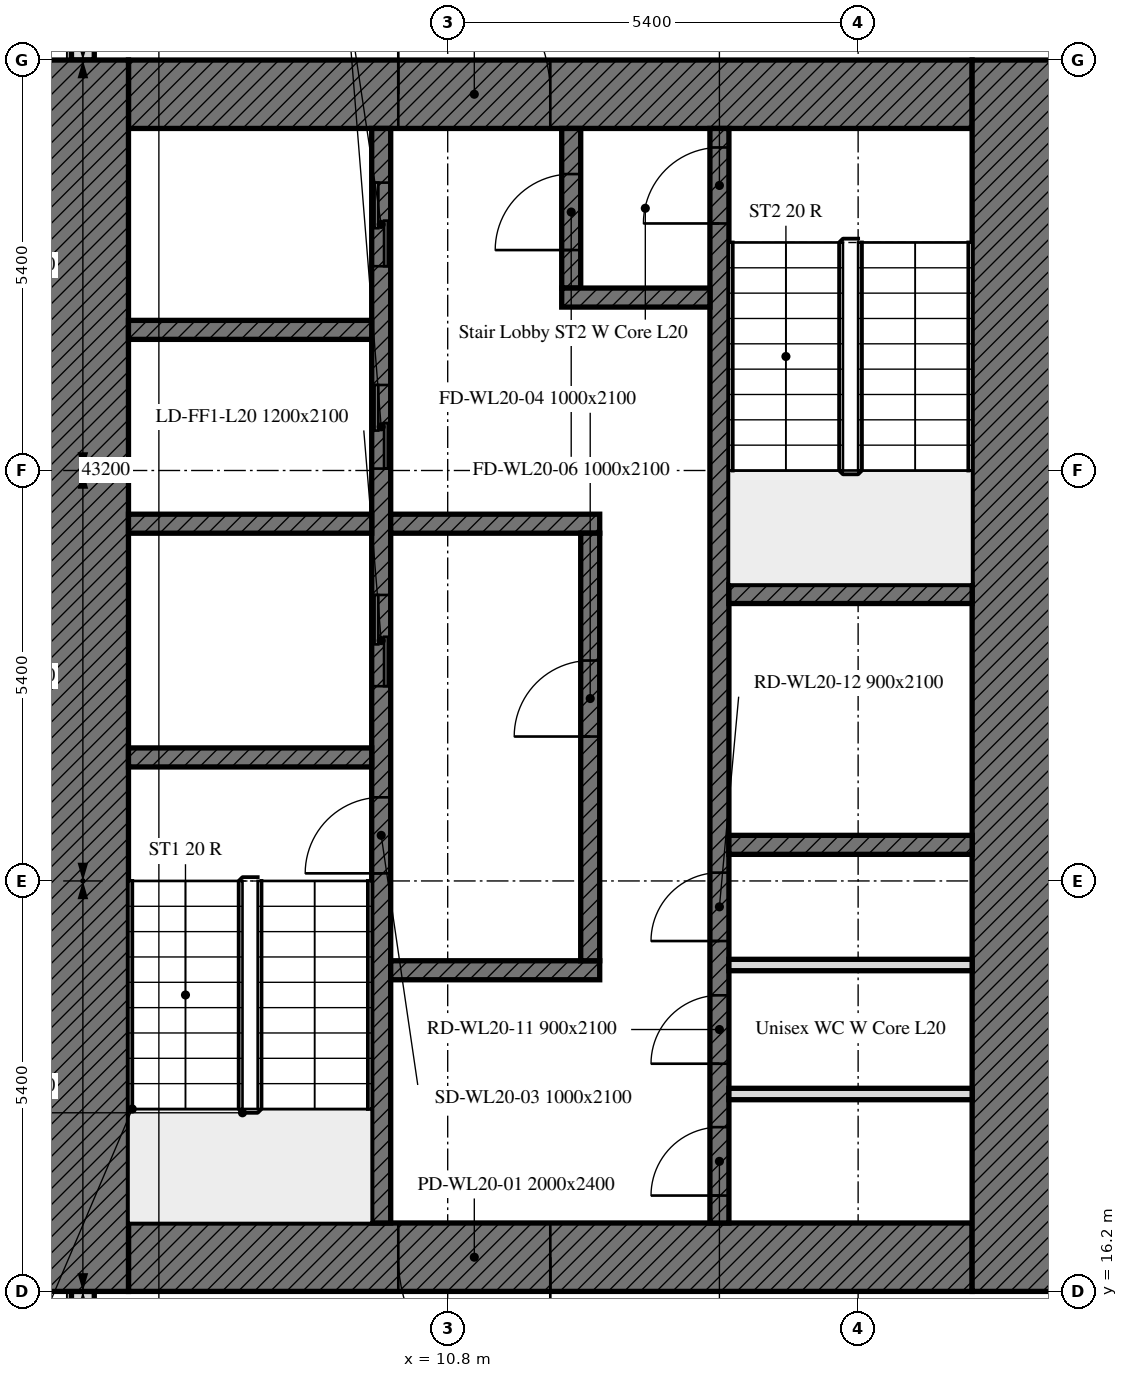
"""IFC4 building model, lengths in metres.
Left out: names, types, materials, properties, quantities, classifications, styles, units other than length and angle.
Written with IfcOpenShell. Run it as: python <this file> out.ifc"""

import sys

from ifc_helpers import new_model, si_unit, direction, frame, frame_2d, origin, place, context, subcontext, project, spatial, rectangle, extrude, element, fill, save


model = new_model("IFC4")
c1 = context("Model", 3, precision=1e-05, world=origin(), true_north=direction((0.0, 1.0)))
c2 = subcontext(c1, "Body", "Model", "MODEL_VIEW")
j1 = project(units=[si_unit("LENGTHUNIT", "METRE"), si_unit("PLANEANGLEUNIT", "RADIAN")], contexts=[c1])
p1 = place(None, origin())
s1 = spatial("IfcSite", under=j1, at=p1, CompositionType="ELEMENT")
p2 = place(p1, origin())
s2 = spatial("IfcBuilding", under=s1, at=p2, CompositionType="ELEMENT")
p3 = place(p2, frame((0.0, 0.0, 87.8)))
s3 = spatial("IfcBuildingStorey", under=s2, at=p3, CompositionType="ELEMENT", Elevation=87.8)
p4 = place(p3, frame((6.0, 43.014, 0.0), z_axis=(0.0, 0.0, 1.0), x_axis=(0.0, -1.0, 0.0)))
e1 = element("IfcWall", 1, at=p4, inside=s3, PredefinedType="SOLIDWALL", context=c2, shape_type="SweptSolid", body=[
    extrude(rectangle(XDim=10.614, YDim=0.3, at=frame_2d((5.307, 0.0))), origin(), (0.0, 0.0, 1.0), 3.5),
])
p5 = place(p4, frame((0.814, 0.0, 0.9)))
e2 = element("IfcOpeningElement", 2, at=p5, cuts=e1, PredefinedType="OPENING", context=c2, shape_type="SweptSolid", body=[
    extrude(rectangle(XDim=3.4, YDim=1.7, at=frame_2d((1.7, 0.85))), frame((0.0, 0.16, 0.0), z_axis=(0.0, -1.0, 0.0), x_axis=(1.0, 0.0, 0.0)), (0.0, 0.0, 1.0), 0.32),
])
p6 = place(p3, frame((6.0, 16.2, 0.0), z_axis=(0.0, 0.0, 1.0), x_axis=(0.0, -1.0, 0.0)))
e3 = element("IfcWall", 3, at=p6, inside=s3, PredefinedType="SOLIDWALL", context=c2, shape_type="SweptSolid", body=[
    extrude(rectangle(XDim=5.214, YDim=0.3, at=frame_2d((2.607, 0.0))), origin(), (0.0, 0.0, 1.0), 3.5),
])
p7 = place(p3, frame((17.7, 16.65, 0.0), z_axis=(0.0, 0.0, 1.0), x_axis=(-1.0, 0.0, 0.0)))
e4 = element("IfcWall", 4, at=p7, inside=s3, PredefinedType="SOLIDWALL", context=c2, shape_type="SweptSolid", body=[
    extrude(rectangle(XDim=11.1, YDim=0.9, at=frame_2d((5.55, 0.0))), origin(), (0.0, 0.0, 1.0), 3.5),
])
p8 = place(p7, frame((5.55, 0.0, 0.0)))
e5 = element("IfcOpeningElement", 5, at=p8, cuts=e4, PredefinedType="OPENING", context=c2, shape_type="SweptSolid", body=[
    extrude(rectangle(XDim=2.0, YDim=2.4, at=frame_2d((1.0, 1.2))), frame((0.0, 0.45, 0.0), z_axis=(0.0, -1.0, 0.0), x_axis=(1.0, 0.0, 0.0)), (0.0, 0.0, 1.0), 0.9),
])
p9 = place(p3, frame((6.6, 31.95, 0.0), z_axis=(0.0, 0.0, 1.0), x_axis=(1.0, 0.0, 0.0)))
e6 = element("IfcWall", 6, at=p9, inside=s3, PredefinedType="SOLIDWALL", context=c2, shape_type="SweptSolid", body=[
    extrude(rectangle(XDim=11.1, YDim=0.9, at=frame_2d((5.55, 0.0))), origin(), (0.0, 0.0, 1.0), 3.5),
])
p10 = place(p9, frame((3.55, 0.0, 0.0)))
e7 = element("IfcOpeningElement", 7, at=p10, cuts=e6, PredefinedType="OPENING", context=c2, shape_type="SweptSolid", body=[
    extrude(rectangle(XDim=2.0, YDim=2.4, at=frame_2d((1.0, 1.2))), frame((0.0, 0.45, 0.0), z_axis=(0.0, -1.0, 0.0), x_axis=(1.0, 0.0, 0.0)), (0.0, 0.0, 1.0), 0.9),
])
for number, where, z_axis, x_axis in (
    (8, (6.0, 16.2, 0.0), (0.0, 0.0, 1.0), (0.0, 1.0, 0.0)),
    (9, (18.3, 32.4, 0.0), (0.0, 0.0, 1.0), (0.0, -1.0, 0.0)),
):
    element("IfcWall", number, at=place(p3, frame(where, z_axis=z_axis, x_axis=x_axis)), inside=s3, PredefinedType="SOLIDWALL", context=c2, shape_type="SweptSolid", body=[
        extrude(rectangle(XDim=16.2, YDim=1.2, at=frame_2d((8.1, 0.0))), origin(), (0.0, 0.0, 1.0), 3.5),
    ])
p11 = place(p3, frame((9.925, 17.1, 0.0), z_axis=(0.0, 0.0, 1.0), x_axis=(0.0, 1.0, 0.0)))
e10 = element("IfcWall", 10, at=p11, inside=s3, PredefinedType="SOLIDWALL", context=c2, shape_type="SweptSolid", body=[
    extrude(rectangle(XDim=14.4, YDim=0.25, at=frame_2d((7.2, 0.0))), origin(), (0.0, 0.0, 1.0), 3.5),
])
p12 = place(p11, frame((4.6, 0.0, 0.0)))
e11 = element("IfcOpeningElement", 11, at=p12, cuts=e10, PredefinedType="OPENING", context=c2, shape_type="SweptSolid", body=[
    extrude(rectangle(XDim=1.0, YDim=2.1, at=frame_2d((0.5, 1.05))), frame((0.0, 0.125, 0.0), z_axis=(0.0, -1.0, 0.0), x_axis=(1.0, 0.0, 0.0)), (0.0, 0.0, 1.0), 0.25),
])
p13 = place(p11, frame((7.062, 0.0, 0.0)))
e12 = element("IfcOpeningElement", 12, at=p13, cuts=e10, PredefinedType="OPENING", context=c2, shape_type="SweptSolid", body=[
    extrude(rectangle(XDim=1.2, YDim=2.1, at=frame_2d((0.6, 1.05))), frame((0.0, 0.125, 0.0), z_axis=(0.0, -1.0, 0.0), x_axis=(1.0, 0.0, 0.0)), (0.0, 0.0, 1.0), 0.25),
])
p14 = place(p11, frame((9.925, 0.0, 0.0)))
e13 = element("IfcOpeningElement", 13, at=p14, cuts=e10, PredefinedType="OPENING", context=c2, shape_type="SweptSolid", body=[
    extrude(rectangle(XDim=1.1, YDim=2.1, at=frame_2d((0.55, 1.05))), frame((0.0, 0.125, 0.0), z_axis=(0.0, -1.0, 0.0), x_axis=(1.0, 0.0, 0.0)), (0.0, 0.0, 1.0), 0.25),
])
p15 = place(p11, frame((12.587, 0.0, 0.0)))
e14 = element("IfcOpeningElement", 14, at=p15, cuts=e10, PredefinedType="OPENING", context=c2, shape_type="SweptSolid", body=[
    extrude(rectangle(XDim=1.1, YDim=2.1, at=frame_2d((0.55, 1.05))), frame((0.0, 0.125, 0.0), z_axis=(0.0, -1.0, 0.0), x_axis=(1.0, 0.0, 0.0)), (0.0, 0.0, 1.0), 0.25),
])
p16 = place(p3, frame((14.375, 17.1, 0.0), z_axis=(0.0, 0.0, 1.0), x_axis=(0.0, 1.0, 0.0)))
e15 = element("IfcWall", 15, at=p16, inside=s3, PredefinedType="SOLIDWALL", context=c2, shape_type="SweptSolid", body=[
    extrude(rectangle(XDim=14.4, YDim=0.25, at=frame_2d((7.2, 0.0))), origin(), (0.0, 0.0, 1.0), 3.5),
])
p17 = place(p16, frame((13.15, 0.0, 0.0)))
e16 = element("IfcOpeningElement", 16, at=p17, cuts=e15, PredefinedType="OPENING", context=c2, shape_type="SweptSolid", body=[
    extrude(rectangle(XDim=1.0, YDim=2.1, at=frame_2d((0.5, 1.05))), frame((0.0, 0.125, 0.0), z_axis=(0.0, -1.0, 0.0), x_axis=(1.0, 0.0, 0.0)), (0.0, 0.0, 1.0), 0.25),
])
p18 = place(p16, frame((0.361, 0.0, 0.0)))
e17 = element("IfcOpeningElement", 17, at=p18, cuts=e15, PredefinedType="OPENING", context=c2, shape_type="SweptSolid", body=[
    extrude(rectangle(XDim=0.9, YDim=2.1, at=frame_2d((0.45, 1.05))), frame((0.0, 0.125, 0.0), z_axis=(0.0, -1.0, 0.0), x_axis=(1.0, 0.0, 0.0)), (0.0, 0.0, 1.0), 0.25),
])
p19 = place(p16, frame((2.095, 0.0, 0.0)))
e18 = element("IfcOpeningElement", 18, at=p19, cuts=e15, PredefinedType="OPENING", context=c2, shape_type="SweptSolid", body=[
    extrude(rectangle(XDim=0.9, YDim=2.1, at=frame_2d((0.45, 1.05))), frame((0.0, 0.125, 0.0), z_axis=(0.0, -1.0, 0.0), x_axis=(1.0, 0.0, 0.0)), (0.0, 0.0, 1.0), 0.25),
])
p20 = place(p16, frame((3.709, 0.0, 0.0)))
e19 = element("IfcOpeningElement", 19, at=p20, cuts=e15, PredefinedType="OPENING", context=c2, shape_type="SweptSolid", body=[
    extrude(rectangle(XDim=0.9, YDim=2.1, at=frame_2d((0.45, 1.05))), frame((0.0, 0.125, 0.0), z_axis=(0.0, -1.0, 0.0), x_axis=(1.0, 0.0, 0.0)), (0.0, 0.0, 1.0), 0.25),
])
for number, where, z_axis, x_axis in (
    (20, (6.6, 23.225, 0.0), (0.0, 0.0, 1.0), (1.0, 0.0, 0.0)),
    (21, (14.5, 25.375, 0.0), (0.0, 0.0, 1.0), (1.0, 0.0, 0.0)),
    (22, (14.5, 22.075, 0.0), (0.0, 0.0, 1.0), (1.0, 0.0, 0.0)),
    (23, (6.6, 26.3, 0.0), (0.0, 0.0, 1.0), (1.0, 0.0, 0.0)),
):
    element("IfcWall", number, at=place(p3, frame(where, z_axis=z_axis, x_axis=x_axis)), inside=s3, PredefinedType="SOLIDWALL", context=c2, shape_type="SweptSolid", body=[
        extrude(rectangle(XDim=3.2, YDim=0.25, at=frame_2d((1.6, 0.0))), origin(), (0.0, 0.0, 1.0), 3.5),
    ])
for number, where, z_axis, x_axis in (
    (24, (10.05, 26.3, 0.0), (0.0, 0.0, 1.0), (1.0, 0.0, 0.0)),
    (25, (10.05, 20.425, 0.0), (0.0, 0.0, 1.0), (1.0, 0.0, 0.0)),
):
    element("IfcWall", number, at=place(p3, frame(where, z_axis=z_axis, x_axis=x_axis)), inside=s3, PredefinedType="SOLIDWALL", context=c2, shape_type="SweptSolid", body=[
        extrude(rectangle(XDim=2.75, YDim=0.25, at=frame_2d((1.375, 0.0))), origin(), (0.0, 0.0, 1.0), 3.5),
    ])
p21 = place(p3, frame((12.425, 29.4, 0.0), z_axis=(0.0, 0.0, 1.0), x_axis=(0.0, 1.0, 0.0)))
e26 = element("IfcWall", 26, at=p21, inside=s3, PredefinedType="SOLIDWALL", context=c2, shape_type="SweptSolid", body=[
    extrude(rectangle(XDim=2.1, YDim=0.25, at=frame_2d((1.05, 0.0))), origin(), (0.0, 0.0, 1.0), 3.5),
])
p22 = place(p21, frame((0.5, 0.0, 0.0)))
e27 = element("IfcOpeningElement", 27, at=p22, cuts=e26, PredefinedType="OPENING", context=c2, shape_type="SweptSolid", body=[
    extrude(rectangle(XDim=1.0, YDim=2.1, at=frame_2d((0.5, 1.05))), frame((0.0, 0.125, 0.0), z_axis=(0.0, -1.0, 0.0), x_axis=(1.0, 0.0, 0.0)), (0.0, 0.0, 1.0), 0.25),
])
p23 = place(p3, frame((12.3, 29.275, 0.0), z_axis=(0.0, 0.0, 1.0), x_axis=(1.0, 0.0, 0.0)))
e28 = element("IfcWall", 28, at=p23, inside=s3, PredefinedType="SOLIDWALL", context=c2, shape_type="SweptSolid", body=[
    extrude(rectangle(XDim=1.95, YDim=0.25, at=frame_2d((0.975, 0.0))), origin(), (0.0, 0.0, 1.0), 3.5),
])
p24 = place(p3, frame((12.675, 20.55, 0.0), z_axis=(0.0, 0.0, 1.0), x_axis=(0.0, 1.0, 0.0)))
e29 = element("IfcWall", 29, at=p24, inside=s3, PredefinedType="SOLIDWALL", context=c2, shape_type="SweptSolid", body=[
    extrude(rectangle(XDim=5.625, YDim=0.25, at=frame_2d((2.812, 0.0))), origin(), (0.0, 0.0, 1.0), 3.5),
])
p25 = place(p24, frame((2.95, 0.0, 0.0)))
e30 = element("IfcOpeningElement", 30, at=p25, cuts=e29, PredefinedType="OPENING", context=c2, shape_type="SweptSolid", body=[
    extrude(rectangle(XDim=1.0, YDim=2.1, at=frame_2d((0.5, 1.05))), frame((0.0, 0.125, 0.0), z_axis=(0.0, -1.0, 0.0), x_axis=(1.0, 0.0, 0.0)), (0.0, 0.0, 1.0), 0.25),
])
p26 = place(p3, frame((6.6, 28.85, 0.0), z_axis=(0.0, 0.0, 1.0), x_axis=(1.0, 0.0, 0.0)))
e31 = element("IfcWall", 31, at=p26, inside=s3, PredefinedType="SOLIDWALL", context=c2, shape_type="SweptSolid", body=[
    extrude(rectangle(XDim=3.2, YDim=0.25, at=frame_2d((1.6, 0.0))), origin(), (0.0, 0.0, 1.0), 3.5),
])
for number, where, z_axis, x_axis in (
    (32, (14.5, 18.797, 0.0), (0.0, 0.0, 1.0), (1.0, 0.0, 0.0)),
    (33, (14.5, 20.494, 0.0), (0.0, 0.0, 1.0), (1.0, 0.0, 0.0)),
):
    element("IfcWall", number, at=place(p3, frame(where, z_axis=z_axis, x_axis=x_axis)), inside=s3, PredefinedType="PARTITIONING", context=c2, shape_type="SweptSolid", body=[
        extrude(rectangle(XDim=3.2, YDim=0.15, at=frame_2d((1.6, 0.0))), origin(), (0.0, 0.0, 1.0), 3.5),
    ])
p27 = place(p8, origin())
e34 = element("IfcDoor", 34, at=p27, inside=s3, OperationType="DOUBLE_DOOR_SINGLE_SWING", PredefinedType="DOOR", context=c2, shape_type="SweptSolid", body=[
    extrude(rectangle(XDim=2.0, YDim=2.4, at=frame_2d((1.0, 1.2))), frame((0.0, 0.025, 0.0), z_axis=(0.0, -1.0, 0.0), x_axis=(1.0, 0.0, 0.0)), (0.0, 0.0, 1.0), 0.05),
])
fill(e5, e34)
p28 = place(p10, origin())
e35 = element("IfcDoor", 35, at=p28, inside=s3, OperationType="DOUBLE_DOOR_SINGLE_SWING", PredefinedType="DOOR", context=c2, shape_type="SweptSolid", body=[
    extrude(rectangle(XDim=2.0, YDim=2.4, at=frame_2d((1.0, 1.2))), frame((0.0, 0.025, 0.0), z_axis=(0.0, -1.0, 0.0), x_axis=(1.0, 0.0, 0.0)), (0.0, 0.0, 1.0), 0.05),
])
fill(e7, e35)
p29 = place(p12, origin())
e36 = element("IfcDoor", 36, at=p29, inside=s3, OperationType="SINGLE_SWING_LEFT", PredefinedType="DOOR", context=c2, shape_type="SweptSolid", body=[
    extrude(rectangle(XDim=1.0, YDim=2.1, at=frame_2d((0.5, 1.05))), frame((0.0, 0.025, 0.0), z_axis=(0.0, -1.0, 0.0), x_axis=(1.0, 0.0, 0.0)), (0.0, 0.0, 1.0), 0.05),
])
fill(e11, e36)
p30 = place(p25, origin())
e37 = element("IfcDoor", 37, at=p30, inside=s3, OperationType="SINGLE_SWING_LEFT", PredefinedType="DOOR", context=c2, shape_type="SweptSolid", body=[
    extrude(rectangle(XDim=1.0, YDim=2.1, at=frame_2d((0.5, 1.05))), frame((0.0, 0.025, 0.0), z_axis=(0.0, -1.0, 0.0), x_axis=(1.0, 0.0, 0.0)), (0.0, 0.0, 1.0), 0.05),
])
fill(e30, e37)
p31 = place(p17, origin())
e38 = element("IfcDoor", 38, at=p31, inside=s3, OperationType="SINGLE_SWING_LEFT", PredefinedType="DOOR", context=c2, shape_type="SweptSolid", body=[
    extrude(rectangle(XDim=1.0, YDim=2.1, at=frame_2d((0.5, 1.05))), frame((0.0, 0.025, 0.0), z_axis=(0.0, -1.0, 0.0), x_axis=(1.0, 0.0, 0.0)), (0.0, 0.0, 1.0), 0.05),
])
fill(e16, e38)
p32 = place(p22, origin())
e39 = element("IfcDoor", 39, at=p32, inside=s3, OperationType="SINGLE_SWING_LEFT", PredefinedType="DOOR", context=c2, shape_type="SweptSolid", body=[
    extrude(rectangle(XDim=1.0, YDim=2.1, at=frame_2d((0.5, 1.05))), frame((0.0, 0.025, 0.0), z_axis=(0.0, -1.0, 0.0), x_axis=(1.0, 0.0, 0.0)), (0.0, 0.0, 1.0), 0.05),
])
fill(e27, e39)
p33 = place(p13, origin())
e40 = element("IfcDoor", 40, at=p33, inside=s3, OperationType="DOUBLE_DOOR_SLIDING", PredefinedType="DOOR", context=c2, shape_type="SweptSolid", body=[
    extrude(rectangle(XDim=1.2, YDim=2.1, at=frame_2d((0.6, 1.05))), frame((0.0, 0.025, 0.0), z_axis=(0.0, -1.0, 0.0), x_axis=(1.0, 0.0, 0.0)), (0.0, 0.0, 1.0), 0.05),
])
fill(e12, e40)
p34 = place(p14, origin())
e41 = element("IfcDoor", 41, at=p34, inside=s3, OperationType="DOUBLE_DOOR_SLIDING", PredefinedType="DOOR", context=c2, shape_type="SweptSolid", body=[
    extrude(rectangle(XDim=1.1, YDim=2.1, at=frame_2d((0.55, 1.05))), frame((0.0, 0.025, 0.0), z_axis=(0.0, -1.0, 0.0), x_axis=(1.0, 0.0, 0.0)), (0.0, 0.0, 1.0), 0.05),
])
fill(e13, e41)
p35 = place(p15, origin())
e42 = element("IfcDoor", 42, at=p35, inside=s3, OperationType="DOUBLE_DOOR_SLIDING", PredefinedType="DOOR", context=c2, shape_type="SweptSolid", body=[
    extrude(rectangle(XDim=1.1, YDim=2.1, at=frame_2d((0.55, 1.05))), frame((0.0, 0.025, 0.0), z_axis=(0.0, -1.0, 0.0), x_axis=(1.0, 0.0, 0.0)), (0.0, 0.0, 1.0), 0.05),
])
fill(e14, e42)
p36 = place(p18, origin())
e43 = element("IfcDoor", 43, at=p36, inside=s3, OperationType="SINGLE_SWING_LEFT", PredefinedType="DOOR", context=c2, shape_type="SweptSolid", body=[
    extrude(rectangle(XDim=0.9, YDim=2.1, at=frame_2d((0.45, 1.05))), frame((0.0, 0.025, 0.0), z_axis=(0.0, -1.0, 0.0), x_axis=(1.0, 0.0, 0.0)), (0.0, 0.0, 1.0), 0.05),
])
fill(e17, e43)
p37 = place(p19, origin())
e44 = element("IfcDoor", 44, at=p37, inside=s3, OperationType="SINGLE_SWING_LEFT", PredefinedType="DOOR", context=c2, shape_type="SweptSolid", body=[
    extrude(rectangle(XDim=0.9, YDim=2.1, at=frame_2d((0.45, 1.05))), frame((0.0, 0.025, 0.0), z_axis=(0.0, -1.0, 0.0), x_axis=(1.0, 0.0, 0.0)), (0.0, 0.0, 1.0), 0.05),
])
fill(e18, e44)
p38 = place(p20, origin())
e45 = element("IfcDoor", 45, at=p38, inside=s3, OperationType="SINGLE_SWING_LEFT", PredefinedType="DOOR", context=c2, shape_type="SweptSolid", body=[
    extrude(rectangle(XDim=0.9, YDim=2.1, at=frame_2d((0.45, 1.05))), frame((0.0, 0.025, 0.0), z_axis=(0.0, -1.0, 0.0), x_axis=(1.0, 0.0, 0.0)), (0.0, 0.0, 1.0), 0.05),
])
fill(e19, e45)
save(model, sys.argv[1])
